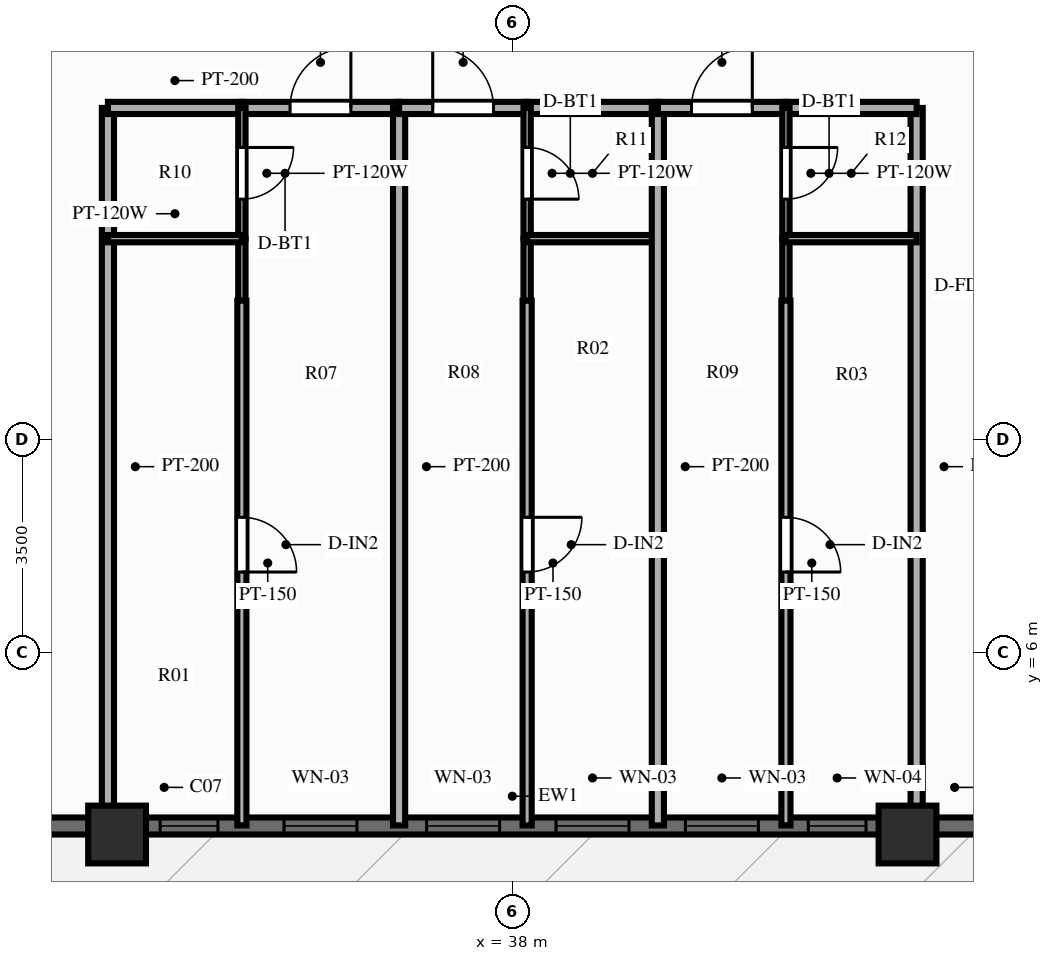
"""IFC4 building model, lengths in metres.
Left out: names, types, materials, properties, quantities, classifications, styles, units other than length and angle.
Written with IfcOpenShell. Run it as: python <this file> out.ifc"""

import sys

from ifc_helpers import new_model, si_unit, direction, frame, frame_2d, origin, origin_2d, place, context, subcontext, project, spatial, rectangle, extrude, source, transform, mapped, element, fill, save


model = new_model("IFC4")
c1 = context("Model", 3, precision=1e-05, world=origin(), true_north=direction((0.0, 1.0)))
c2 = subcontext(c1, "Body", "Model", "MODEL_VIEW")
j1 = project(units=[si_unit("LENGTHUNIT", "METRE"), si_unit("PLANEANGLEUNIT", "RADIAN")], contexts=[c1])
p1 = place(None, origin())
s1 = spatial("IfcSite", under=j1, at=p1, CompositionType="ELEMENT")
p2 = place(p1, origin())
s2 = spatial("IfcBuilding", under=s1, at=p2, CompositionType="ELEMENT")
p3 = place(p2, frame((0.0, 0.0, 107.85)))
s3 = spatial("IfcBuildingStorey", under=s2, at=p3, CompositionType="ELEMENT", Elevation=107.85)
m1 = source(origin(), c2, "Body", "SweptSolid", [
    extrude(rectangle(XDim=0.95, YDim=0.95, at=origin_2d()), origin(), (0.0, 0.0, 1.0), 3.0),
])
for number, where, z_axis, x_axis in (
    (1, (31.5, 3.0, 0.0), (0.0, 0.0, 1.0), (1.0, 0.0, 0.0)),
    (2, (44.5, 3.0, 0.0), (0.0, 0.0, 1.0), (1.0, 0.0, 0.0)),
):
    element("IfcColumn", number, at=place(p3, frame(where, z_axis=z_axis, x_axis=x_axis)), inside=s3, PredefinedType="COLUMN", context=c2, shape_type="MappedRepresentation", body=[
        mapped(m1, transform((0.0, 0.0, 0.0), scale=1.0)),
    ])
p4 = place(p3, frame((16.2, 3.14, 0.0), z_axis=(0.0, 0.0, 1.0), x_axis=(1.0, 0.0, 0.0)))
e3 = element("IfcWall", 3, at=p4, inside=s3, PredefinedType="SOLIDWALL", context=c2, shape_type="SweptSolid", body=[
    extrude(rectangle(XDim=43.6, YDim=0.28, at=frame_2d((21.8, 0.0))), origin(), (0.0, 0.0, 1.0), 2.28),
])
p5 = place(p4, frame((8.2, 0.0, 0.0), z_axis=(0.0, 0.0, 1.0), x_axis=(-1.0, 0.0, 0.0)))
e4 = element("IfcOpeningElement", 4, at=p5, cuts=e3, PredefinedType="OPENING", context=c2, shape_type="SweptSolid", body=[
    extrude(rectangle(XDim=1.1, YDim=2.15, at=frame_2d((0.55, 1.075))), frame((0.0, 0.152, 0.0), z_axis=(0.0, -1.0, 0.0), x_axis=(1.0, 0.0, 0.0)), (0.0, 0.0, 1.0), 0.304),
])
p6 = place(p4, frame((16.009, 0.0, 0.25)))
e5 = element("IfcOpeningElement", 5, at=p6, cuts=e3, PredefinedType="OPENING", context=c2, shape_type="SweptSolid", body=[
    extrude(rectangle(XDim=0.95, YDim=1.5, at=frame_2d((0.475, 0.75))), frame((0.0, 0.152, 0.0), z_axis=(0.0, -1.0, 0.0), x_axis=(1.0, 0.0, 0.0)), (0.0, 0.0, 1.0), 0.304),
])
p7 = place(p4, frame((18.045, 0.0, 0.25)))
e6 = element("IfcOpeningElement", 6, at=p7, cuts=e3, PredefinedType="OPENING", context=c2, shape_type="SweptSolid", body=[
    extrude(rectangle(XDim=1.2, YDim=1.5, at=frame_2d((0.6, 0.75))), frame((0.0, 0.152, 0.0), z_axis=(0.0, -1.0, 0.0), x_axis=(1.0, 0.0, 0.0)), (0.0, 0.0, 1.0), 0.304),
])
p8 = place(p4, frame((20.391, 0.0, 0.25)))
e7 = element("IfcOpeningElement", 7, at=p8, cuts=e3, PredefinedType="OPENING", context=c2, shape_type="SweptSolid", body=[
    extrude(rectangle(XDim=1.2, YDim=1.5, at=frame_2d((0.6, 0.75))), frame((0.0, 0.152, 0.0), z_axis=(0.0, -1.0, 0.0), x_axis=(1.0, 0.0, 0.0)), (0.0, 0.0, 1.0), 0.304),
])
p9 = place(p4, frame((22.519, 0.0, 0.25)))
e8 = element("IfcOpeningElement", 8, at=p9, cuts=e3, PredefinedType="OPENING", context=c2, shape_type="SweptSolid", body=[
    extrude(rectangle(XDim=1.2, YDim=1.5, at=frame_2d((0.6, 0.75))), frame((0.0, 0.152, 0.0), z_axis=(0.0, -1.0, 0.0), x_axis=(1.0, 0.0, 0.0)), (0.0, 0.0, 1.0), 0.304),
])
p10 = place(p4, frame((24.647, 0.0, 0.25)))
e9 = element("IfcOpeningElement", 9, at=p10, cuts=e3, PredefinedType="OPENING", context=c2, shape_type="SweptSolid", body=[
    extrude(rectangle(XDim=1.2, YDim=1.5, at=frame_2d((0.6, 0.75))), frame((0.0, 0.152, 0.0), z_axis=(0.0, -1.0, 0.0), x_axis=(1.0, 0.0, 0.0)), (0.0, 0.0, 1.0), 0.304),
])
p11 = place(p4, frame((26.667, 0.0, 0.25)))
e10 = element("IfcOpeningElement", 10, at=p11, cuts=e3, PredefinedType="OPENING", context=c2, shape_type="SweptSolid", body=[
    extrude(rectangle(XDim=0.95, YDim=1.5, at=frame_2d((0.475, 0.75))), frame((0.0, 0.152, 0.0), z_axis=(0.0, -1.0, 0.0), x_axis=(1.0, 0.0, 0.0)), (0.0, 0.0, 1.0), 0.304),
])
p12 = place(p4, frame((35.35, 0.0, 0.25)))
e11 = element("IfcOpeningElement", 11, at=p12, cuts=e3, PredefinedType="OPENING", context=c2, shape_type="SweptSolid", body=[
    extrude(rectangle(XDim=1.2, YDim=1.5, at=frame_2d((0.6, 0.75))), frame((0.0, 0.152, 0.0), z_axis=(0.0, -1.0, 0.0), x_axis=(1.0, 0.0, 0.0)), (0.0, 0.0, 1.0), 0.304),
])
for number, where, z_axis, x_axis in (
    (12, (31.35, 14.95, 0.0), (0.0, 0.0, 1.0), (0.0, -1.0, 0.0)),
    (13, (44.65, 14.95, 0.0), (0.0, 0.0, 1.0), (0.0, -1.0, 0.0)),
):
    element("IfcWall", number, at=place(p3, frame(where, z_axis=z_axis, x_axis=x_axis)), inside=s3, PredefinedType="PARTITIONING", context=c2, shape_type="SweptSolid", body=[
        extrude(rectangle(XDim=11.8, YDim=0.2, at=frame_2d((5.9, 0.0))), origin(), (0.0, 0.0, 1.0), 2.34),
    ])
p13 = place(p3, frame((31.35, 14.95, 0.0), z_axis=(0.0, 0.0, 1.0), x_axis=(1.0, 0.0, 0.0)))
e14 = element("IfcWall", 14, at=p13, inside=s3, PredefinedType="PARTITIONING", context=c2, shape_type="SweptSolid", body=[
    extrude(rectangle(XDim=2.202, YDim=0.2, at=frame_2d((1.101, 0.0))), origin(), (0.0, 0.0, 1.0), 2.79),
])
p14 = place(p3, frame((33.552, 14.95, 0.0), z_axis=(0.0, 0.0, 1.0), x_axis=(1.0, 0.0, 0.0)))
e15 = element("IfcWall", 15, at=p14, inside=s3, PredefinedType="PARTITIONING", context=c2, shape_type="SweptSolid", body=[
    extrude(rectangle(XDim=2.585, YDim=0.2, at=frame_2d((1.293, 0.0))), origin(), (0.0, 0.0, 1.0), 2.79),
])
p15 = place(p14, frame((0.793, 0.0, 0.0)))
e16 = element("IfcOpeningElement", 16, at=p15, cuts=e15, PredefinedType="OPENING", context=c2, shape_type="SweptSolid", body=[
    extrude(rectangle(XDim=1.0, YDim=2.15, at=frame_2d((0.5, 1.075))), frame((0.0, 0.112, 0.0), z_axis=(0.0, -1.0, 0.0), x_axis=(1.0, 0.0, 0.0)), (0.0, 0.0, 1.0), 0.224),
])
p16 = place(p3, frame((33.552, 14.95, 0.0), z_axis=(0.0, 0.0, 1.0), x_axis=(0.0, -1.0, 0.0)))
e17 = element("IfcWall", 17, at=p16, inside=s3, PredefinedType="PARTITIONING", context=c2, shape_type="SweptSolid", body=[
    extrude(rectangle(XDim=2.15, YDim=0.12, at=frame_2d((1.075, 0.0))), origin(), (0.0, 0.0, 1.0), 2.79),
])
p17 = place(p16, frame((0.65, 0.0, 0.0)))
e18 = element("IfcOpeningElement", 18, at=p17, cuts=e17, PredefinedType="OPENING", context=c2, shape_type="SweptSolid", body=[
    extrude(rectangle(XDim=0.85, YDim=2.05, at=frame_2d((0.425, 1.025))), frame((0.0, 0.072, 0.0), z_axis=(0.0, -1.0, 0.0), x_axis=(1.0, 0.0, 0.0)), (0.0, 0.0, 1.0), 0.144),
])
p18 = place(p3, frame((33.552, 12.8, 0.0), z_axis=(0.0, 0.0, 1.0), x_axis=(0.0, -1.0, 0.0)))
e19 = element("IfcWall", 19, at=p18, inside=s3, PredefinedType="PARTITIONING", context=c2, shape_type="SweptSolid", body=[
    extrude(rectangle(XDim=1.02, YDim=0.12, at=frame_2d((0.51, 0.0))), origin(), (0.0, 0.0, 1.0), 2.79),
])
p19 = place(p3, frame((31.35, 12.8, 0.0), z_axis=(0.0, 0.0, 1.0), x_axis=(1.0, 0.0, 0.0)))
e20 = element("IfcWall", 20, at=p19, inside=s3, PredefinedType="PARTITIONING", context=c2, shape_type="SweptSolid", body=[
    extrude(rectangle(XDim=2.202, YDim=0.12, at=frame_2d((1.101, 0.0))), origin(), (0.0, 0.0, 1.0), 2.79),
])
p20 = place(p3, frame((33.552, 11.78, 0.0), z_axis=(0.0, 0.0, 1.0), x_axis=(0.0, -1.0, 0.0)))
e21 = element("IfcWall", 21, at=p20, inside=s3, PredefinedType="PARTITIONING", context=c2, shape_type="SweptSolid", body=[
    extrude(rectangle(XDim=8.63, YDim=0.15, at=frame_2d((4.315, 0.0))), origin(), (0.0, 0.0, 1.0), 2.79),
])
p21 = place(p20, frame((3.563, 0.0, 0.0)))
e22 = element("IfcOpeningElement", 22, at=p21, cuts=e21, PredefinedType="OPENING", context=c2, shape_type="SweptSolid", body=[
    extrude(rectangle(XDim=0.9, YDim=2.1, at=frame_2d((0.45, 1.05))), frame((0.0, 0.087, 0.0), z_axis=(0.0, -1.0, 0.0), x_axis=(1.0, 0.0, 0.0)), (0.0, 0.0, 1.0), 0.174),
])
p22 = place(p3, frame((36.138, 14.95, 0.0), z_axis=(0.0, 0.0, 1.0), x_axis=(0.0, -1.0, 0.0)))
e23 = element("IfcWall", 23, at=p22, inside=s3, PredefinedType="PARTITIONING", context=c2, shape_type="SweptSolid", body=[
    extrude(rectangle(XDim=11.8, YDim=0.2, at=frame_2d((5.9, 0.0))), origin(), (0.0, 0.0, 1.0), 2.79),
])
p23 = place(p3, frame((36.138, 14.95, 0.0), z_axis=(0.0, 0.0, 1.0), x_axis=(1.0, 0.0, 0.0)))
e24 = element("IfcWall", 24, at=p23, inside=s3, PredefinedType="PARTITIONING", context=c2, shape_type="SweptSolid", body=[
    extrude(rectangle(XDim=2.106, YDim=0.2, at=frame_2d((1.053, 0.0))), origin(), (0.0, 0.0, 1.0), 2.79),
])
p24 = place(p23, frame((0.553, 0.0, 0.0)))
e25 = element("IfcOpeningElement", 25, at=p24, cuts=e24, PredefinedType="OPENING", context=c2, shape_type="SweptSolid", body=[
    extrude(rectangle(XDim=1.0, YDim=2.15, at=frame_2d((0.5, 1.075))), frame((0.0, 0.112, 0.0), z_axis=(0.0, -1.0, 0.0), x_axis=(1.0, 0.0, 0.0)), (0.0, 0.0, 1.0), 0.224),
])
p25 = place(p3, frame((38.244, 14.95, 0.0), z_axis=(0.0, 0.0, 1.0), x_axis=(1.0, 0.0, 0.0)))
e26 = element("IfcWall", 26, at=p25, inside=s3, PredefinedType="PARTITIONING", context=c2, shape_type="SweptSolid", body=[
    extrude(rectangle(XDim=2.15, YDim=0.2, at=frame_2d((1.075, 0.0))), origin(), (0.0, 0.0, 1.0), 2.79),
])
p26 = place(p3, frame((38.244, 14.95, 0.0), z_axis=(0.0, 0.0, 1.0), x_axis=(0.0, -1.0, 0.0)))
e27 = element("IfcWall", 27, at=p26, inside=s3, PredefinedType="PARTITIONING", context=c2, shape_type="SweptSolid", body=[
    extrude(rectangle(XDim=2.15, YDim=0.12, at=frame_2d((1.075, 0.0))), origin(), (0.0, 0.0, 1.0), 2.79),
])
p27 = place(p26, frame((0.65, 0.0, 0.0)))
e28 = element("IfcOpeningElement", 28, at=p27, cuts=e27, PredefinedType="OPENING", context=c2, shape_type="SweptSolid", body=[
    extrude(rectangle(XDim=0.85, YDim=2.05, at=frame_2d((0.425, 1.025))), frame((0.0, 0.072, 0.0), z_axis=(0.0, -1.0, 0.0), x_axis=(1.0, 0.0, 0.0)), (0.0, 0.0, 1.0), 0.144),
])
p28 = place(p3, frame((38.244, 12.8, 0.0), z_axis=(0.0, 0.0, 1.0), x_axis=(0.0, -1.0, 0.0)))
e29 = element("IfcWall", 29, at=p28, inside=s3, PredefinedType="PARTITIONING", context=c2, shape_type="SweptSolid", body=[
    extrude(rectangle(XDim=1.02, YDim=0.12, at=frame_2d((0.51, 0.0))), origin(), (0.0, 0.0, 1.0), 2.79),
])
p29 = place(p3, frame((38.244, 12.8, 0.0), z_axis=(0.0, 0.0, 1.0), x_axis=(1.0, 0.0, 0.0)))
e30 = element("IfcWall", 30, at=p29, inside=s3, PredefinedType="PARTITIONING", context=c2, shape_type="SweptSolid", body=[
    extrude(rectangle(XDim=2.15, YDim=0.12, at=frame_2d((1.075, 0.0))), origin(), (0.0, 0.0, 1.0), 2.79),
])
p30 = place(p3, frame((38.244, 11.78, 0.0), z_axis=(0.0, 0.0, 1.0), x_axis=(0.0, -1.0, 0.0)))
e31 = element("IfcWall", 31, at=p30, inside=s3, PredefinedType="PARTITIONING", context=c2, shape_type="SweptSolid", body=[
    extrude(rectangle(XDim=8.63, YDim=0.15, at=frame_2d((4.315, 0.0))), origin(), (0.0, 0.0, 1.0), 2.79),
])
p31 = place(p30, frame((3.563, 0.0, 0.0)))
e32 = element("IfcOpeningElement", 32, at=p31, cuts=e31, PredefinedType="OPENING", context=c2, shape_type="SweptSolid", body=[
    extrude(rectangle(XDim=0.9, YDim=2.1, at=frame_2d((0.45, 1.05))), frame((0.0, 0.087, 0.0), z_axis=(0.0, -1.0, 0.0), x_axis=(1.0, 0.0, 0.0)), (0.0, 0.0, 1.0), 0.174),
])
p32 = place(p3, frame((40.394, 14.95, 0.0), z_axis=(0.0, 0.0, 1.0), x_axis=(0.0, -1.0, 0.0)))
e33 = element("IfcWall", 33, at=p32, inside=s3, PredefinedType="PARTITIONING", context=c2, shape_type="SweptSolid", body=[
    extrude(rectangle(XDim=11.8, YDim=0.2, at=frame_2d((5.9, 0.0))), origin(), (0.0, 0.0, 1.0), 2.79),
])
p33 = place(p3, frame((40.394, 14.95, 0.0), z_axis=(0.0, 0.0, 1.0), x_axis=(1.0, 0.0, 0.0)))
e34 = element("IfcWall", 34, at=p33, inside=s3, PredefinedType="PARTITIONING", context=c2, shape_type="SweptSolid", body=[
    extrude(rectangle(XDim=2.106, YDim=0.2, at=frame_2d((1.053, 0.0))), origin(), (0.0, 0.0, 1.0), 2.79),
])
p34 = place(p33, frame((0.553, 0.0, 0.0)))
e35 = element("IfcOpeningElement", 35, at=p34, cuts=e34, PredefinedType="OPENING", context=c2, shape_type="SweptSolid", body=[
    extrude(rectangle(XDim=1.0, YDim=2.15, at=frame_2d((0.5, 1.075))), frame((0.0, 0.112, 0.0), z_axis=(0.0, -1.0, 0.0), x_axis=(1.0, 0.0, 0.0)), (0.0, 0.0, 1.0), 0.224),
])
p35 = place(p3, frame((42.5, 14.95, 0.0), z_axis=(0.0, 0.0, 1.0), x_axis=(1.0, 0.0, 0.0)))
e36 = element("IfcWall", 36, at=p35, inside=s3, PredefinedType="PARTITIONING", context=c2, shape_type="SweptSolid", body=[
    extrude(rectangle(XDim=2.15, YDim=0.2, at=frame_2d((1.075, 0.0))), origin(), (0.0, 0.0, 1.0), 2.79),
])
p36 = place(p3, frame((42.5, 14.95, 0.0), z_axis=(0.0, 0.0, 1.0), x_axis=(0.0, -1.0, 0.0)))
e37 = element("IfcWall", 37, at=p36, inside=s3, PredefinedType="PARTITIONING", context=c2, shape_type="SweptSolid", body=[
    extrude(rectangle(XDim=2.15, YDim=0.12, at=frame_2d((1.075, 0.0))), origin(), (0.0, 0.0, 1.0), 2.79),
])
p37 = place(p36, frame((0.65, 0.0, 0.0)))
e38 = element("IfcOpeningElement", 38, at=p37, cuts=e37, PredefinedType="OPENING", context=c2, shape_type="SweptSolid", body=[
    extrude(rectangle(XDim=0.85, YDim=2.05, at=frame_2d((0.425, 1.025))), frame((0.0, 0.072, 0.0), z_axis=(0.0, -1.0, 0.0), x_axis=(1.0, 0.0, 0.0)), (0.0, 0.0, 1.0), 0.144),
])
p38 = place(p3, frame((42.5, 12.8, 0.0), z_axis=(0.0, 0.0, 1.0), x_axis=(0.0, -1.0, 0.0)))
e39 = element("IfcWall", 39, at=p38, inside=s3, PredefinedType="PARTITIONING", context=c2, shape_type="SweptSolid", body=[
    extrude(rectangle(XDim=1.02, YDim=0.12, at=frame_2d((0.51, 0.0))), origin(), (0.0, 0.0, 1.0), 2.79),
])
p39 = place(p3, frame((42.5, 12.8, 0.0), z_axis=(0.0, 0.0, 1.0), x_axis=(1.0, 0.0, 0.0)))
e40 = element("IfcWall", 40, at=p39, inside=s3, PredefinedType="PARTITIONING", context=c2, shape_type="SweptSolid", body=[
    extrude(rectangle(XDim=2.15, YDim=0.12, at=frame_2d((1.075, 0.0))), origin(), (0.0, 0.0, 1.0), 2.79),
])
p40 = place(p3, frame((42.5, 11.78, 0.0), z_axis=(0.0, 0.0, 1.0), x_axis=(0.0, -1.0, 0.0)))
e41 = element("IfcWall", 41, at=p40, inside=s3, PredefinedType="PARTITIONING", context=c2, shape_type="SweptSolid", body=[
    extrude(rectangle(XDim=8.63, YDim=0.15, at=frame_2d((4.315, 0.0))), origin(), (0.0, 0.0, 1.0), 2.79),
])
p41 = place(p40, frame((3.563, 0.0, 0.0)))
e42 = element("IfcOpeningElement", 42, at=p41, cuts=e41, PredefinedType="OPENING", context=c2, shape_type="SweptSolid", body=[
    extrude(rectangle(XDim=0.9, YDim=2.1, at=frame_2d((0.45, 1.05))), frame((0.0, 0.087, 0.0), z_axis=(0.0, -1.0, 0.0), x_axis=(1.0, 0.0, 0.0)), (0.0, 0.0, 1.0), 0.174),
])
m2 = source(origin(), c2, "Body", "SweptSolid", [
    extrude(rectangle(XDim=0.95, YDim=1.5, at=frame_2d((0.475, 0.75))), frame((0.0, 0.03, 0.0), z_axis=(0.0, -1.0, 0.0), x_axis=(1.0, 0.0, 0.0)), (0.0, 0.0, 1.0), 0.06),
])
p42 = place(p6, origin())
e43 = element("IfcWindow", 43, at=p42, inside=s3, PartitioningType="SINGLE_PANEL", PredefinedType="WINDOW", context=c2, shape_type="MappedRepresentation", body=[
    mapped(m2, transform((0.0, 0.0, 0.0), scale=1.0)),
])
fill(e5, e43)
m3 = source(origin(), c2, "Body", "SweptSolid", [
    extrude(rectangle(XDim=1.2, YDim=1.5, at=frame_2d((0.6, 0.75))), frame((0.0, 0.03, 0.0), z_axis=(0.0, -1.0, 0.0), x_axis=(1.0, 0.0, 0.0)), (0.0, 0.0, 1.0), 0.06),
])
p43 = place(p7, origin())
e44 = element("IfcWindow", 44, at=p43, inside=s3, PartitioningType="SINGLE_PANEL", PredefinedType="WINDOW", context=c2, shape_type="MappedRepresentation", body=[
    mapped(m3, transform((0.0, 0.0, 0.0), scale=1.0)),
])
fill(e6, e44)
p44 = place(p8, origin())
e45 = element("IfcWindow", 45, at=p44, inside=s3, PartitioningType="SINGLE_PANEL", PredefinedType="WINDOW", context=c2, shape_type="MappedRepresentation", body=[
    mapped(m3, transform((0.0, 0.0, 0.0), scale=1.0)),
])
fill(e7, e45)
p45 = place(p9, origin())
e46 = element("IfcWindow", 46, at=p45, inside=s3, PartitioningType="SINGLE_PANEL", PredefinedType="WINDOW", context=c2, shape_type="MappedRepresentation", body=[
    mapped(m3, transform((0.0, 0.0, 0.0), scale=1.0)),
])
fill(e8, e46)
p46 = place(p10, origin())
e47 = element("IfcWindow", 47, at=p46, inside=s3, PartitioningType="SINGLE_PANEL", PredefinedType="WINDOW", context=c2, shape_type="MappedRepresentation", body=[
    mapped(m3, transform((0.0, 0.0, 0.0), scale=1.0)),
])
fill(e9, e47)
p47 = place(p11, origin())
e48 = element("IfcWindow", 48, at=p47, inside=s3, PartitioningType="SINGLE_PANEL", PredefinedType="WINDOW", context=c2, shape_type="MappedRepresentation", body=[
    mapped(m2, transform((0.0, 0.0, 0.0), scale=1.0)),
])
fill(e10, e48)
m4 = source(origin(), c2, "Body", "SweptSolid", [
    extrude(rectangle(XDim=1.0, YDim=2.15, at=frame_2d((0.5, 1.075))), frame((0.0, 0.025, 0.0), z_axis=(0.0, -1.0, 0.0), x_axis=(1.0, 0.0, 0.0)), (0.0, 0.0, 1.0), 0.05),
])
p48 = place(p15, origin())
e49 = element("IfcDoor", 49, at=p48, inside=s3, OperationType="SINGLE_SWING_RIGHT", PredefinedType="DOOR", context=c2, shape_type="MappedRepresentation", body=[
    mapped(m4, transform((0.0, 0.0, 0.0), scale=1.0)),
])
fill(e16, e49)
m5 = source(origin(), c2, "Body", "SweptSolid", [
    extrude(rectangle(XDim=0.85, YDim=2.05, at=frame_2d((0.425, 1.025))), frame((0.0, 0.025, 0.0), z_axis=(0.0, -1.0, 0.0), x_axis=(1.0, 0.0, 0.0)), (0.0, 0.0, 1.0), 0.05),
])
p49 = place(p17, origin())
e50 = element("IfcDoor", 50, at=p49, inside=s3, OperationType="SINGLE_SWING_LEFT", PredefinedType="DOOR", context=c2, shape_type="MappedRepresentation", body=[
    mapped(m5, transform((0.0, 0.0, 0.0), scale=1.0)),
])
fill(e18, e50)
m6 = source(origin(), c2, "Body", "SweptSolid", [
    extrude(rectangle(XDim=0.9, YDim=2.1, at=frame_2d((0.45, 1.05))), frame((0.0, 0.025, 0.0), z_axis=(0.0, -1.0, 0.0), x_axis=(1.0, 0.0, 0.0)), (0.0, 0.0, 1.0), 0.05),
])
p50 = place(p21, origin())
e51 = element("IfcDoor", 51, at=p50, inside=s3, OperationType="SINGLE_SWING_RIGHT", PredefinedType="DOOR", context=c2, shape_type="MappedRepresentation", body=[
    mapped(m6, transform((0.0, 0.0, 0.0), scale=1.0)),
])
fill(e22, e51)
p51 = place(p24, origin())
e52 = element("IfcDoor", 52, at=p51, inside=s3, OperationType="SINGLE_SWING_LEFT", PredefinedType="DOOR", context=c2, shape_type="MappedRepresentation", body=[
    mapped(m4, transform((0.0, 0.0, 0.0), scale=1.0)),
])
fill(e25, e52)
p52 = place(p27, origin())
e53 = element("IfcDoor", 53, at=p52, inside=s3, OperationType="SINGLE_SWING_RIGHT", PredefinedType="DOOR", context=c2, shape_type="MappedRepresentation", body=[
    mapped(m5, transform((0.0, 0.0, 0.0), scale=1.0)),
])
fill(e28, e53)
p53 = place(p31, origin())
e54 = element("IfcDoor", 54, at=p53, inside=s3, OperationType="SINGLE_SWING_LEFT", PredefinedType="DOOR", context=c2, shape_type="MappedRepresentation", body=[
    mapped(m6, transform((0.0, 0.0, 0.0), scale=1.0)),
])
fill(e32, e54)
p54 = place(p34, origin())
e55 = element("IfcDoor", 55, at=p54, inside=s3, OperationType="SINGLE_SWING_RIGHT", PredefinedType="DOOR", context=c2, shape_type="MappedRepresentation", body=[
    mapped(m4, transform((0.0, 0.0, 0.0), scale=1.0)),
])
fill(e35, e55)
p55 = place(p37, origin())
e56 = element("IfcDoor", 56, at=p55, inside=s3, OperationType="SINGLE_SWING_LEFT", PredefinedType="DOOR", context=c2, shape_type="MappedRepresentation", body=[
    mapped(m5, transform((0.0, 0.0, 0.0), scale=1.0)),
])
fill(e38, e56)
p56 = place(p41, origin())
e57 = element("IfcDoor", 57, at=p56, inside=s3, OperationType="SINGLE_SWING_RIGHT", PredefinedType="DOOR", context=c2, shape_type="MappedRepresentation", body=[
    mapped(m6, transform((0.0, 0.0, 0.0), scale=1.0)),
])
fill(e42, e57)
save(model, sys.argv[1])
